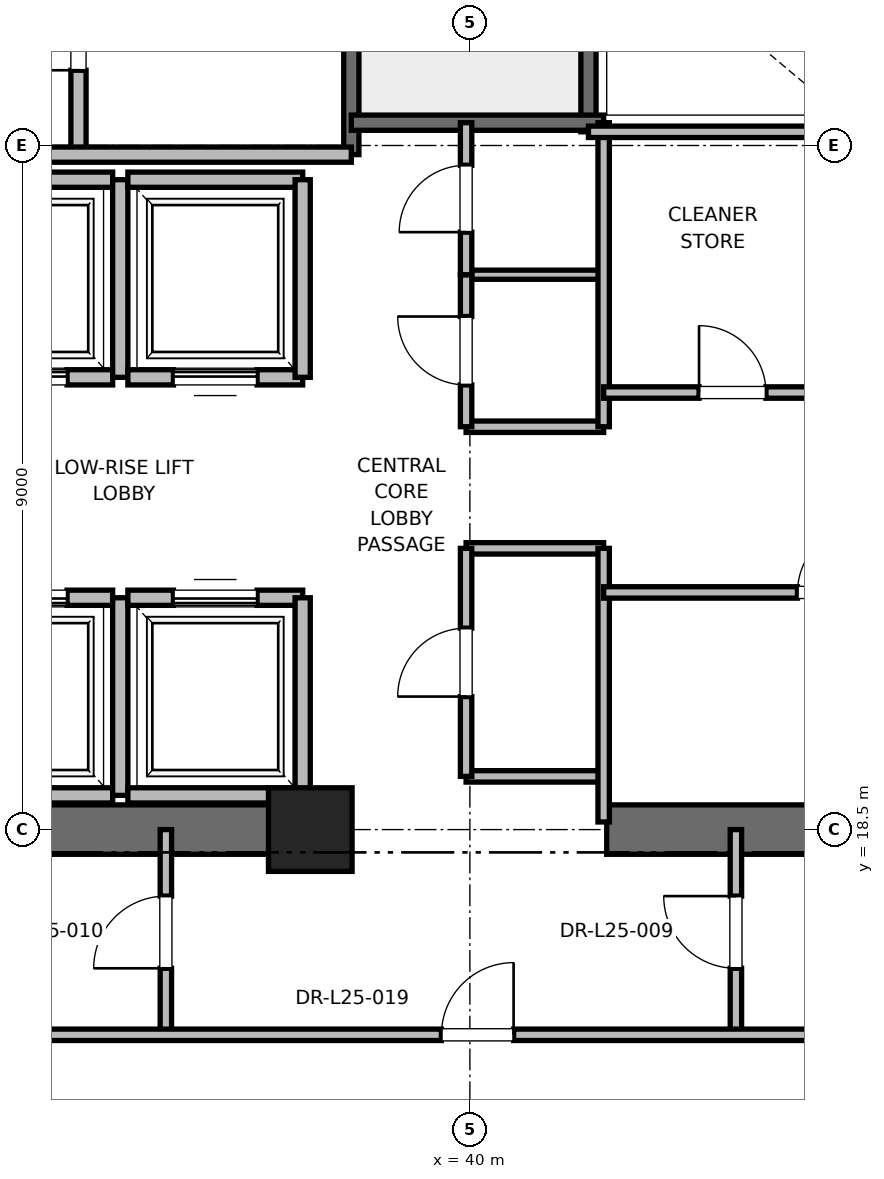
"""IFC4 building model, lengths in metres.
Left out: names, types, materials, properties, quantities, classifications, styles, units other than length and angle.
Written with IfcOpenShell. Run it as: python <this file> out.ifc"""

import sys

from ifc_helpers import new_model, si_unit, direction, frame, frame_2d, origin, origin_2d, place, context, subcontext, project, spatial, rectangle, extrude, element, fill, save


model = new_model("IFC4")
c1 = context("Model", 3, precision=1e-05, world=origin(), true_north=direction((0.0, 1.0)))
c2 = subcontext(c1, "Body", "Model", "MODEL_VIEW")
j1 = project(units=[si_unit("LENGTHUNIT", "METRE"), si_unit("PLANEANGLEUNIT", "RADIAN")], contexts=[c1])
p1 = place(None, origin())
s1 = spatial("IfcSite", under=j1, at=p1, CompositionType="ELEMENT")
p2 = place(p1, origin())
s2 = spatial("IfcBuilding", under=s1, at=p2, CompositionType="ELEMENT")
p3 = place(p2, frame((0.0, 0.0, 107.6)))
s3 = spatial("IfcBuildingStorey", under=s2, at=p3, CompositionType="ELEMENT", Elevation=107.6)
p4 = place(p3, frame((37.9, 18.5, 0.0), z_axis=(0.0, 0.0, 1.0), x_axis=(1.0, 0.0, 0.0)))
e1 = element("IfcColumn", 1, at=p4, inside=s3, PredefinedType="PILASTER", context=c2, shape_type="SweptSolid", body=[
    extrude(rectangle(XDim=1.1, YDim=1.1, at=origin_2d()), origin(), (0.0, 0.0, 1.0), 5.4),
])
for number, where, z_axis, x_axis in (
    (2, (29.0, 18.5, 0.0), (0.0, 0.0, 1.0), (1.0, 0.0, 0.0)),
    (3, (41.8, 18.5, 0.0), (0.0, 0.0, 1.0), (1.0, 0.0, 0.0)),
):
    element("IfcWall", number, at=place(p3, frame(where, z_axis=z_axis, x_axis=x_axis)), inside=s3, PredefinedType="SHEAR", context=c2, shape_type="SweptSolid", body=[
        extrude(rectangle(XDim=9.2, YDim=0.65, at=frame_2d((4.6, 0.0))), origin(), (0.0, 0.0, 1.0), 5.1),
    ])
p5 = place(p3, frame((38.44, 27.38, 0.0), z_axis=(0.0, 0.0, 1.0), x_axis=(0.0, 1.0, 0.0)))
e4 = element("IfcWall", 4, at=p5, inside=s3, PredefinedType="SOLIDWALL", context=c2, shape_type="SweptSolid", body=[
    extrude(rectangle(XDim=8.87, YDim=0.2, at=frame_2d((4.435, 0.0))), origin(), (0.0, 0.0, 1.0), 5.1),
])
p6 = place(p3, frame((41.56, 27.68, 0.0), z_axis=(0.0, 0.0, 1.0), x_axis=(0.0, 1.0, 0.0)))
e5 = element("IfcWall", 5, at=p6, inside=s3, PredefinedType="SOLIDWALL", context=c2, shape_type="SweptSolid", body=[
    extrude(rectangle(XDim=8.57, YDim=0.2, at=frame_2d((4.285, 0.0))), origin(), (0.0, 0.0, 1.0), 5.1),
])
p7 = place(p3, frame((38.44, 27.8, 0.0), z_axis=(0.0, 0.0, 1.0), x_axis=(1.0, 0.0, 0.0)))
e6 = element("IfcWall", 6, at=p7, inside=s3, PredefinedType="SOLIDWALL", context=c2, shape_type="SweptSolid", body=[
    extrude(rectangle(XDim=3.32, YDim=0.2, at=frame_2d((1.66, 0.0))), origin(), (0.0, 0.0, 1.0), 5.1),
])
p8 = place(p3, frame((34.85, 27.38, 0.0), z_axis=(0.0, 0.0, 1.0), x_axis=(0.0, 1.0, 0.0)))
e7 = element("IfcWall", 7, at=p8, inside=s3, PredefinedType="PARTITIONING", context=c2, shape_type="SweptSolid", body=[
    extrude(rectangle(XDim=3.37, YDim=0.2, at=frame_2d((1.685, 0.0))), origin(), (0.0, 0.0, 1.0), 5.1),
])
p9 = place(p8, frame((1.11, 0.0, 0.0)))
e8 = element("IfcOpeningElement", 8, at=p9, cuts=e7, PredefinedType="OPENING", context=c2, shape_type="SweptSolid", body=[
    extrude(rectangle(XDim=1.15, YDim=2.2, at=frame_2d((0.575, 1.1))), frame((0.0, 0.1, 0.0), z_axis=(0.0, -1.0, 0.0), x_axis=(1.0, 0.0, 0.0)), (0.0, 0.0, 1.0), 0.2),
])
p10 = place(p3, frame((32.82, 27.38, 0.0), z_axis=(0.0, 0.0, 1.0), x_axis=(1.0, 0.0, 0.0)))
e9 = element("IfcWall", 9, at=p10, inside=s3, PredefinedType="PARTITIONING", context=c2, shape_type="SweptSolid", body=[
    extrude(rectangle(XDim=5.62, YDim=0.2, at=frame_2d((2.81, 0.0))), origin(), (0.0, 0.0, 1.0), 5.1),
])
p11 = place(p3, frame((33.0, 18.95, 0.0), z_axis=(0.0, 0.0, 1.0), x_axis=(1.0, 0.0, 0.0)))
e10 = element("IfcWall", 10, at=p11, inside=s3, PredefinedType="SOLIDWALL", context=c2, shape_type="SweptSolid", body=[
    extrude(rectangle(XDim=2.3, YDim=0.2, at=frame_2d((1.15, 0.0))), origin(), (0.0, 0.0, 1.0), 5.1),
])
p12 = place(p3, frame((35.3, 21.55, 0.0), z_axis=(0.0, 0.0, 1.0), x_axis=(-1.0, 0.0, 0.0)))
e11 = element("IfcWall", 11, at=p12, inside=s3, PredefinedType="SOLIDWALL", context=c2, shape_type="SweptSolid", body=[
    extrude(rectangle(XDim=2.3, YDim=0.2, at=frame_2d((1.15, 0.0))), origin(), (0.0, 0.0, 1.0), 5.1),
])
p13 = place(p12, frame((0.6, 0.0, 0.0)))
e12 = element("IfcOpeningElement", 12, at=p13, cuts=e11, PredefinedType="OPENING", context=c2, shape_type="SweptSolid", body=[
    extrude(rectangle(XDim=1.1, YDim=2.2, at=frame_2d((0.55, 1.1))), frame((0.0, 0.1, 0.0), z_axis=(0.0, -1.0, 0.0), x_axis=(1.0, 0.0, 0.0)), (0.0, 0.0, 1.0), 0.2),
])
p14 = place(p3, frame((35.4, 18.95, 0.0), z_axis=(0.0, 0.0, 1.0), x_axis=(0.0, 1.0, 0.0)))
e13 = element("IfcWall", 13, at=p14, inside=s3, PredefinedType="SOLIDWALL", context=c2, shape_type="SweptSolid", body=[
    extrude(rectangle(XDim=2.6, YDim=0.2, at=frame_2d((1.3, 0.0))), origin(), (0.0, 0.0, 1.0), 5.1),
])
p15 = place(p3, frame((35.5, 18.95, 0.0), z_axis=(0.0, 0.0, 1.0), x_axis=(1.0, 0.0, 0.0)))
e14 = element("IfcWall", 14, at=p15, inside=s3, PredefinedType="SOLIDWALL", context=c2, shape_type="SweptSolid", body=[
    extrude(rectangle(XDim=2.3, YDim=0.2, at=frame_2d((1.15, 0.0))), origin(), (0.0, 0.0, 1.0), 3.88),
])
p16 = place(p3, frame((37.8, 21.55, 0.0), z_axis=(0.0, 0.0, 1.0), x_axis=(-1.0, 0.0, 0.0)))
e15 = element("IfcWall", 15, at=p16, inside=s3, PredefinedType="SOLIDWALL", context=c2, shape_type="SweptSolid", body=[
    extrude(rectangle(XDim=2.3, YDim=0.2, at=frame_2d((1.15, 0.0))), origin(), (0.0, 0.0, 1.0), 5.1),
])
p17 = place(p16, frame((0.6, 0.0, 0.0)))
e16 = element("IfcOpeningElement", 16, at=p17, cuts=e15, PredefinedType="OPENING", context=c2, shape_type="SweptSolid", body=[
    extrude(rectangle(XDim=1.1, YDim=2.2, at=frame_2d((0.55, 1.1))), frame((0.0, 0.1, 0.0), z_axis=(0.0, -1.0, 0.0), x_axis=(1.0, 0.0, 0.0)), (0.0, 0.0, 1.0), 0.2),
])
p18 = place(p3, frame((37.8, 18.95, 0.0), z_axis=(0.0, 0.0, 1.0), x_axis=(0.0, 1.0, 0.0)))
e17 = element("IfcWall", 17, at=p18, inside=s3, PredefinedType="SOLIDWALL", context=c2, shape_type="SweptSolid", body=[
    extrude(rectangle(XDim=2.6, YDim=0.2, at=frame_2d((1.3, 0.0))), origin(), (0.0, 0.0, 1.0), 3.88),
])
p19 = place(p3, frame((33.0, 24.45, 0.0), z_axis=(0.0, 0.0, 1.0), x_axis=(1.0, 0.0, 0.0)))
e18 = element("IfcWall", 18, at=p19, inside=s3, PredefinedType="SOLIDWALL", context=c2, shape_type="SweptSolid", body=[
    extrude(rectangle(XDim=2.3, YDim=0.2, at=frame_2d((1.15, 0.0))), origin(), (0.0, 0.0, 1.0), 5.1),
])
p20 = place(p19, frame((0.6, 0.0, 0.0)))
e19 = element("IfcOpeningElement", 19, at=p20, cuts=e18, PredefinedType="OPENING", context=c2, shape_type="SweptSolid", body=[
    extrude(rectangle(XDim=1.1, YDim=2.2, at=frame_2d((0.55, 1.1))), frame((0.0, 0.1, 0.0), z_axis=(0.0, -1.0, 0.0), x_axis=(1.0, 0.0, 0.0)), (0.0, 0.0, 1.0), 0.2),
])
p21 = place(p3, frame((35.3, 27.05, 0.0), z_axis=(0.0, 0.0, 1.0), x_axis=(-1.0, 0.0, 0.0)))
e20 = element("IfcWall", 20, at=p21, inside=s3, PredefinedType="SOLIDWALL", context=c2, shape_type="SweptSolid", body=[
    extrude(rectangle(XDim=2.3, YDim=0.2, at=frame_2d((1.15, 0.0))), origin(), (0.0, 0.0, 1.0), 5.1),
])
p22 = place(p3, frame((35.4, 24.45, 0.0), z_axis=(0.0, 0.0, 1.0), x_axis=(0.0, 1.0, 0.0)))
e21 = element("IfcWall", 21, at=p22, inside=s3, PredefinedType="SOLIDWALL", context=c2, shape_type="SweptSolid", body=[
    extrude(rectangle(XDim=2.6, YDim=0.2, at=frame_2d((1.3, 0.0))), origin(), (0.0, 0.0, 1.0), 5.1),
])
p23 = place(p3, frame((35.5, 24.45, 0.0), z_axis=(0.0, 0.0, 1.0), x_axis=(1.0, 0.0, 0.0)))
e22 = element("IfcWall", 22, at=p23, inside=s3, PredefinedType="SOLIDWALL", context=c2, shape_type="SweptSolid", body=[
    extrude(rectangle(XDim=2.3, YDim=0.2, at=frame_2d((1.15, 0.0))), origin(), (0.0, 0.0, 1.0), 5.1),
])
p24 = place(p23, frame((0.6, 0.0, 0.0)))
e23 = element("IfcOpeningElement", 23, at=p24, cuts=e22, PredefinedType="OPENING", context=c2, shape_type="SweptSolid", body=[
    extrude(rectangle(XDim=1.1, YDim=2.2, at=frame_2d((0.55, 1.1))), frame((0.0, 0.1, 0.0), z_axis=(0.0, -1.0, 0.0), x_axis=(1.0, 0.0, 0.0)), (0.0, 0.0, 1.0), 0.2),
])
p25 = place(p3, frame((37.8, 27.05, 0.0), z_axis=(0.0, 0.0, 1.0), x_axis=(-1.0, 0.0, 0.0)))
e24 = element("IfcWall", 24, at=p25, inside=s3, PredefinedType="SOLIDWALL", context=c2, shape_type="SweptSolid", body=[
    extrude(rectangle(XDim=2.3, YDim=0.2, at=frame_2d((1.15, 0.0))), origin(), (0.0, 0.0, 1.0), 5.1),
])
p26 = place(p3, frame((37.8, 24.45, 0.0), z_axis=(0.0, 0.0, 1.0), x_axis=(0.0, 1.0, 0.0)))
e25 = element("IfcWall", 25, at=p26, inside=s3, PredefinedType="SOLIDWALL", context=c2, shape_type="SweptSolid", body=[
    extrude(rectangle(XDim=2.6, YDim=0.2, at=frame_2d((1.3, 0.0))), origin(), (0.0, 0.0, 1.0), 5.1),
])
for number, where, z_axis, x_axis in (
    (26, (39.95, 19.2, 0.0), (0.0, 0.0, 1.0), (1.0, 0.0, 0.0)),
    (27, (39.95, 22.2, 0.0), (0.0, 0.0, 1.0), (1.0, 0.0, 0.0)),
    (28, (39.95, 23.8, 0.0), (0.0, 0.0, 1.0), (1.0, 0.0, 0.0)),
):
    element("IfcWall", number, at=place(p3, frame(where, z_axis=z_axis, x_axis=x_axis)), inside=s3, PredefinedType="PARTITIONING", context=c2, shape_type="SweptSolid", body=[
        extrude(rectangle(XDim=1.81, YDim=0.15, at=frame_2d((0.905, 0.0))), origin(), (0.0, 0.0, 1.0), 2.85),
    ])
p27 = place(p3, frame((39.95, 25.8, 0.0), z_axis=(0.0, 0.0, 1.0), x_axis=(1.0, 0.0, 0.0)))
e29 = element("IfcWall", 29, at=p27, inside=s3, PredefinedType="PARTITIONING", context=c2, shape_type="SweptSolid", body=[
    extrude(rectangle(XDim=1.81, YDim=0.12, at=frame_2d((0.905, 0.0))), origin(), (0.0, 0.0, 1.0), 2.85),
])
p28 = place(p3, frame((41.76, 18.6, 0.0), z_axis=(0.0, 0.0, 1.0), x_axis=(0.0, 1.0, 0.0)))
e30 = element("IfcWall", 30, at=p28, inside=s3, PredefinedType="PARTITIONING", context=c2, shape_type="SweptSolid", body=[
    extrude(rectangle(XDim=3.6, YDim=0.15, at=frame_2d((1.8, 0.0))), origin(), (0.0, 0.0, 1.0), 2.85),
])
p29 = place(p3, frame((41.76, 23.8, 0.0), z_axis=(0.0, 0.0, 1.0), x_axis=(0.0, 1.0, 0.0)))
e31 = element("IfcWall", 31, at=p29, inside=s3, PredefinedType="PARTITIONING", context=c2, shape_type="SweptSolid", body=[
    extrude(rectangle(XDim=4.0, YDim=0.15, at=frame_2d((2.0, 0.0))), origin(), (0.0, 0.0, 1.0), 2.85),
])
p30 = place(p3, frame((39.95, 19.2, 0.0), z_axis=(0.0, 0.0, 1.0), x_axis=(0.0, 1.0, 0.0)))
e32 = element("IfcWall", 32, at=p30, inside=s3, PredefinedType="PARTITIONING", context=c2, shape_type="SweptSolid", body=[
    extrude(rectangle(XDim=3.0, YDim=0.15, at=frame_2d((1.5, 0.0))), origin(), (0.0, 0.0, 1.0), 2.85),
])
p31 = place(p30, frame((1.05, 0.0, 0.0)))
e33 = element("IfcOpeningElement", 33, at=p31, cuts=e32, PredefinedType="OPENING", context=c2, shape_type="SweptSolid", body=[
    extrude(rectangle(XDim=0.9, YDim=2.1, at=frame_2d((0.45, 1.05))), frame((0.0, 0.075, 0.0), z_axis=(0.0, -1.0, 0.0), x_axis=(1.0, 0.0, 0.0)), (0.0, 0.0, 1.0), 0.15),
])
p32 = place(p3, frame((39.95, 23.8, 0.0), z_axis=(0.0, 0.0, 1.0), x_axis=(0.0, 1.0, 0.0)))
e34 = element("IfcWall", 34, at=p32, inside=s3, PredefinedType="PARTITIONING", context=c2, shape_type="SweptSolid", body=[
    extrude(rectangle(XDim=2.0, YDim=0.15, at=frame_2d((1.0, 0.0))), origin(), (0.0, 0.0, 1.0), 2.85),
])
p33 = place(p32, frame((0.55, 0.0, 0.0)))
e35 = element("IfcOpeningElement", 35, at=p33, cuts=e34, PredefinedType="OPENING", context=c2, shape_type="SweptSolid", body=[
    extrude(rectangle(XDim=0.9, YDim=2.1, at=frame_2d((0.45, 1.05))), frame((0.0, 0.075, 0.0), z_axis=(0.0, -1.0, 0.0), x_axis=(1.0, 0.0, 0.0)), (0.0, 0.0, 1.0), 0.15),
])
p34 = place(p3, frame((39.95, 25.8, 0.0), z_axis=(0.0, 0.0, 1.0), x_axis=(0.0, 1.0, 0.0)))
e36 = element("IfcWall", 36, at=p34, inside=s3, PredefinedType="PARTITIONING", context=c2, shape_type="SweptSolid", body=[
    extrude(rectangle(XDim=2.0, YDim=0.15, at=frame_2d((1.0, 0.0))), origin(), (0.0, 0.0, 1.0), 2.85),
])
p35 = place(p34, frame((0.56, 0.0, 0.0)))
e37 = element("IfcOpeningElement", 37, at=p35, cuts=e36, PredefinedType="OPENING", context=c2, shape_type="SweptSolid", body=[
    extrude(rectangle(XDim=0.88, YDim=2.1, at=frame_2d((0.44, 1.05))), frame((0.0, 0.075, 0.0), z_axis=(0.0, -1.0, 0.0), x_axis=(1.0, 0.0, 0.0)), (0.0, 0.0, 1.0), 0.15),
])
p36 = place(p3, frame((41.56, 27.68, 0.0), z_axis=(0.0, 0.0, 1.0), x_axis=(1.0, 0.0, 0.0)))
e38 = element("IfcWall", 38, at=p36, inside=s3, PredefinedType="PARTITIONING", context=c2, shape_type="SweptSolid", body=[
    extrude(rectangle(XDim=3.59, YDim=0.15, at=frame_2d((1.795, 0.0))), origin(), (0.0, 0.0, 1.0), 2.85),
])
p37 = place(p3, frame((41.76, 21.62, 0.0), z_axis=(0.0, 0.0, 1.0), x_axis=(1.0, 0.0, 0.0)))
e39 = element("IfcWall", 39, at=p37, inside=s3, PredefinedType="PARTITIONING", context=c2, shape_type="SweptSolid", body=[
    extrude(rectangle(XDim=5.98, YDim=0.15, at=frame_2d((2.99, 0.0))), origin(), (0.0, 0.0, 1.0), 2.85),
])
p38 = place(p37, frame((2.55, 0.0, 0.0)))
e40 = element("IfcOpeningElement", 40, at=p38, cuts=e39, PredefinedType="OPENING", context=c2, shape_type="SweptSolid", body=[
    extrude(rectangle(XDim=0.88, YDim=2.1, at=frame_2d((0.44, 1.05))), frame((0.0, 0.075, 0.0), z_axis=(0.0, -1.0, 0.0), x_axis=(1.0, 0.0, 0.0)), (0.0, 0.0, 1.0), 0.15),
])
p39 = place(p3, frame((41.76, 24.25, 0.0), z_axis=(0.0, 0.0, 1.0), x_axis=(1.0, 0.0, 0.0)))
e41 = element("IfcWall", 41, at=p39, inside=s3, PredefinedType="PARTITIONING", context=c2, shape_type="SweptSolid", body=[
    extrude(rectangle(XDim=3.39, YDim=0.15, at=frame_2d((1.695, 0.0))), origin(), (0.0, 0.0, 1.0), 2.85),
])
p40 = place(p39, frame((1.255, 0.0, 0.0)))
e42 = element("IfcOpeningElement", 42, at=p40, cuts=e41, PredefinedType="OPENING", context=c2, shape_type="SweptSolid", body=[
    extrude(rectangle(XDim=0.88, YDim=2.1, at=frame_2d((0.44, 1.05))), frame((0.0, 0.075, 0.0), z_axis=(0.0, -1.0, 0.0), x_axis=(1.0, 0.0, 0.0)), (0.0, 0.0, 1.0), 0.15),
])
p41 = place(p3, frame((36.0, 15.8, 0.0), z_axis=(0.0, 0.0, 1.0), x_axis=(0.0, 1.0, 0.0)))
e43 = element("IfcWall", 43, at=p41, inside=s3, PredefinedType="PARTITIONING", context=c2, shape_type="SweptSolid", body=[
    extrude(rectangle(XDim=2.7, YDim=0.15, at=frame_2d((1.35, 0.0))), origin(), (0.0, 0.0, 1.0), 2.85),
])
p42 = place(p41, frame((0.875, 0.0, 0.0)))
e44 = element("IfcOpeningElement", 44, at=p42, cuts=e43, PredefinedType="OPENING", context=c2, shape_type="SweptSolid", body=[
    extrude(rectangle(XDim=0.95, YDim=2.15, at=frame_2d((0.475, 1.075))), frame((0.0, 0.075, 0.0), z_axis=(0.0, -1.0, 0.0), x_axis=(1.0, 0.0, 0.0)), (0.0, 0.0, 1.0), 0.15),
])
p43 = place(p3, frame((43.5, 15.8, 0.0), z_axis=(0.0, 0.0, 1.0), x_axis=(0.0, 1.0, 0.0)))
e45 = element("IfcWall", 45, at=p43, inside=s3, PredefinedType="PARTITIONING", context=c2, shape_type="SweptSolid", body=[
    extrude(rectangle(XDim=2.7, YDim=0.15, at=frame_2d((1.35, 0.0))), origin(), (0.0, 0.0, 1.0), 2.85),
])
p44 = place(p43, frame((0.875, 0.0, 0.0)))
e46 = element("IfcOpeningElement", 46, at=p44, cuts=e45, PredefinedType="OPENING", context=c2, shape_type="SweptSolid", body=[
    extrude(rectangle(XDim=0.95, YDim=2.15, at=frame_2d((0.475, 1.075))), frame((0.0, 0.075, 0.0), z_axis=(0.0, -1.0, 0.0), x_axis=(1.0, 0.0, 0.0)), (0.0, 0.0, 1.0), 0.15),
])
p45 = place(p3, frame((29.25, 15.8, 0.0), z_axis=(0.0, 0.0, 1.0), x_axis=(1.0, 0.0, 0.0)))
e47 = element("IfcWall", 47, at=p45, inside=s3, PredefinedType="PARTITIONING", context=c2, shape_type="SweptSolid", body=[
    extrude(rectangle(XDim=21.5, YDim=0.15, at=frame_2d((10.75, 0.0))), origin(), (0.0, 0.0, 1.0), 2.85),
])
p46 = place(p45, frame((10.375, 0.0, 0.0)))
e48 = element("IfcOpeningElement", 48, at=p46, cuts=e47, PredefinedType="OPENING", context=c2, shape_type="SweptSolid", body=[
    extrude(rectangle(XDim=0.95, YDim=2.15, at=frame_2d((0.475, 1.075))), frame((0.0, 0.075, 0.0), z_axis=(0.0, -1.0, 0.0), x_axis=(1.0, 0.0, 0.0)), (0.0, 0.0, 1.0), 0.15),
])
p47 = place(p9, origin())
e49 = element("IfcDoor", 49, at=p47, inside=s3, OperationType="SINGLE_SWING_LEFT", PredefinedType="DOOR", context=c2, shape_type="SweptSolid", body=[
    extrude(rectangle(XDim=1.15, YDim=2.2, at=frame_2d((0.575, 1.1))), frame((0.0, 0.025, 0.0), z_axis=(0.0, -1.0, 0.0), x_axis=(1.0, 0.0, 0.0)), (0.0, 0.0, 1.0), 0.05),
])
fill(e8, e49)
p48 = place(p13, origin())
e50 = element("IfcDoor", 50, at=p48, inside=s3, OperationType="SLIDING_TO_RIGHT", PredefinedType="DOOR", context=c2, shape_type="SweptSolid", body=[
    extrude(rectangle(XDim=1.1, YDim=2.2, at=frame_2d((0.55, 1.1))), frame((0.0, 0.025, 0.0), z_axis=(0.0, -1.0, 0.0), x_axis=(1.0, 0.0, 0.0)), (0.0, 0.0, 1.0), 0.05),
])
fill(e12, e50)
p49 = place(p17, origin())
e51 = element("IfcDoor", 51, at=p49, inside=s3, OperationType="SLIDING_TO_RIGHT", PredefinedType="DOOR", context=c2, shape_type="SweptSolid", body=[
    extrude(rectangle(XDim=1.1, YDim=2.2, at=frame_2d((0.55, 1.1))), frame((0.0, 0.025, 0.0), z_axis=(0.0, -1.0, 0.0), x_axis=(1.0, 0.0, 0.0)), (0.0, 0.0, 1.0), 0.05),
])
fill(e16, e51)
p50 = place(p20, origin())
e52 = element("IfcDoor", 52, at=p50, inside=s3, OperationType="SLIDING_TO_RIGHT", PredefinedType="DOOR", context=c2, shape_type="SweptSolid", body=[
    extrude(rectangle(XDim=1.1, YDim=2.2, at=frame_2d((0.55, 1.1))), frame((0.0, 0.025, 0.0), z_axis=(0.0, -1.0, 0.0), x_axis=(1.0, 0.0, 0.0)), (0.0, 0.0, 1.0), 0.05),
])
fill(e19, e52)
p51 = place(p24, origin())
e53 = element("IfcDoor", 53, at=p51, inside=s3, OperationType="SLIDING_TO_RIGHT", PredefinedType="DOOR", context=c2, shape_type="SweptSolid", body=[
    extrude(rectangle(XDim=1.1, YDim=2.2, at=frame_2d((0.55, 1.1))), frame((0.0, 0.025, 0.0), z_axis=(0.0, -1.0, 0.0), x_axis=(1.0, 0.0, 0.0)), (0.0, 0.0, 1.0), 0.05),
])
fill(e23, e53)
p52 = place(p31, origin())
e54 = element("IfcDoor", 54, at=p52, inside=s3, OperationType="SINGLE_SWING_LEFT", PredefinedType="DOOR", context=c2, shape_type="SweptSolid", body=[
    extrude(rectangle(XDim=0.9, YDim=2.1, at=frame_2d((0.45, 1.05))), frame((0.0, 0.025, 0.0), z_axis=(0.0, -1.0, 0.0), x_axis=(1.0, 0.0, 0.0)), (0.0, 0.0, 1.0), 0.05),
])
fill(e33, e54)
p53 = place(p33, origin())
e55 = element("IfcDoor", 55, at=p53, inside=s3, OperationType="SINGLE_SWING_RIGHT", PredefinedType="DOOR", context=c2, shape_type="SweptSolid", body=[
    extrude(rectangle(XDim=0.9, YDim=2.1, at=frame_2d((0.45, 1.05))), frame((0.0, 0.025, 0.0), z_axis=(0.0, -1.0, 0.0), x_axis=(1.0, 0.0, 0.0)), (0.0, 0.0, 1.0), 0.05),
])
fill(e35, e55)
p54 = place(p35, origin())
e56 = element("IfcDoor", 56, at=p54, inside=s3, OperationType="SINGLE_SWING_LEFT", PredefinedType="DOOR", context=c2, shape_type="SweptSolid", body=[
    extrude(rectangle(XDim=0.88, YDim=2.1, at=frame_2d((0.44, 1.05))), frame((0.0, 0.025, 0.0), z_axis=(0.0, -1.0, 0.0), x_axis=(1.0, 0.0, 0.0)), (0.0, 0.0, 1.0), 0.05),
])
fill(e37, e56)
p55 = place(p38, origin())
e57 = element("IfcDoor", 57, at=p55, inside=s3, OperationType="SINGLE_SWING_RIGHT", PredefinedType="DOOR", context=c2, shape_type="SweptSolid", body=[
    extrude(rectangle(XDim=0.88, YDim=2.1, at=frame_2d((0.44, 1.05))), frame((0.0, 0.025, 0.0), z_axis=(0.0, -1.0, 0.0), x_axis=(1.0, 0.0, 0.0)), (0.0, 0.0, 1.0), 0.05),
])
fill(e40, e57)
p56 = place(p40, origin())
e58 = element("IfcDoor", 58, at=p56, inside=s3, OperationType="SINGLE_SWING_LEFT", PredefinedType="DOOR", context=c2, shape_type="SweptSolid", body=[
    extrude(rectangle(XDim=0.88, YDim=2.1, at=frame_2d((0.44, 1.05))), frame((0.0, 0.025, 0.0), z_axis=(0.0, -1.0, 0.0), x_axis=(1.0, 0.0, 0.0)), (0.0, 0.0, 1.0), 0.05),
])
fill(e42, e58)
p57 = place(p42, origin())
e59 = element("IfcDoor", 59, at=p57, inside=s3, OperationType="SINGLE_SWING_LEFT", PredefinedType="DOOR", context=c2, shape_type="SweptSolid", body=[
    extrude(rectangle(XDim=0.95, YDim=2.15, at=frame_2d((0.475, 1.075))), frame((0.0, 0.025, 0.0), z_axis=(0.0, -1.0, 0.0), x_axis=(1.0, 0.0, 0.0)), (0.0, 0.0, 1.0), 0.05),
])
fill(e44, e59)
p58 = place(p44, origin())
e60 = element("IfcDoor", 60, at=p58, inside=s3, OperationType="SINGLE_SWING_RIGHT", PredefinedType="DOOR", context=c2, shape_type="SweptSolid", body=[
    extrude(rectangle(XDim=0.95, YDim=2.15, at=frame_2d((0.475, 1.075))), frame((0.0, 0.025, 0.0), z_axis=(0.0, -1.0, 0.0), x_axis=(1.0, 0.0, 0.0)), (0.0, 0.0, 1.0), 0.05),
])
fill(e46, e60)
p59 = place(p46, origin())
e61 = element("IfcDoor", 61, at=p59, inside=s3, OperationType="SINGLE_SWING_RIGHT", PredefinedType="DOOR", context=c2, shape_type="SweptSolid", body=[
    extrude(rectangle(XDim=0.95, YDim=2.15, at=frame_2d((0.475, 1.075))), frame((0.0, 0.025, 0.0), z_axis=(0.0, -1.0, 0.0), x_axis=(1.0, 0.0, 0.0)), (0.0, 0.0, 1.0), 0.05),
])
fill(e48, e61)
save(model, sys.argv[1])
